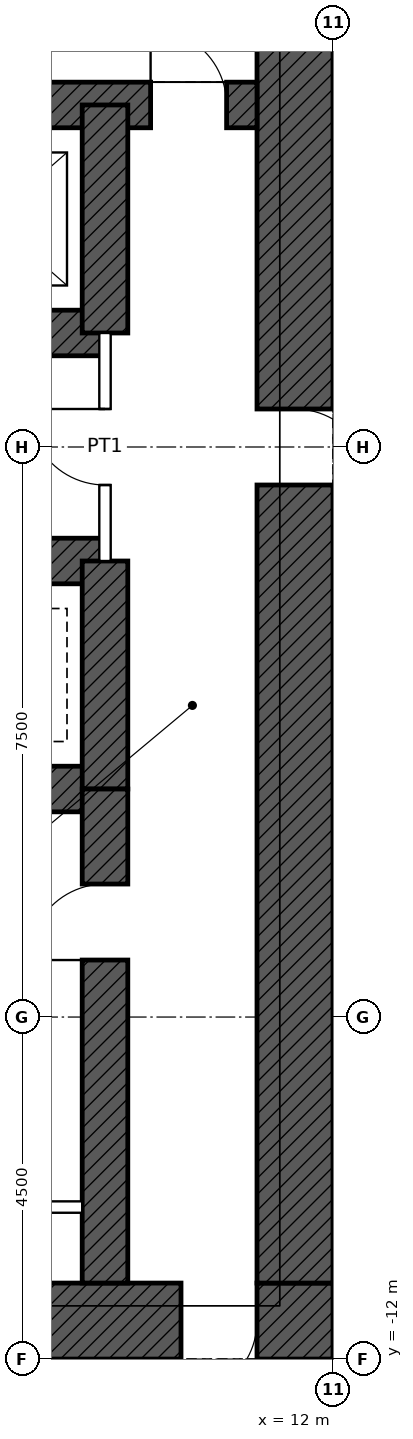
"""IFC4 building model, lengths in metres.
Left out: names, types, materials, properties, quantities, classifications, styles, units other than length and angle.
Written with IfcOpenShell. Run it as: python <this file> out.ifc"""

import sys

from ifc_helpers import new_model, si_unit, direction, frame, frame_2d, origin, place, context, subcontext, project, spatial, rectangle, extrude, element, fill, save


model = new_model("IFC4")
c1 = context("Model", 3, precision=1e-05, world=origin(), true_north=direction((0.0, 1.0)))
c2 = subcontext(c1, "Body", "Model", "MODEL_VIEW")
j1 = project(units=[si_unit("LENGTHUNIT", "METRE"), si_unit("PLANEANGLEUNIT", "RADIAN")], contexts=[c1])
p1 = place(None, origin())
s1 = spatial("IfcSite", under=j1, at=p1, CompositionType="ELEMENT")
p2 = place(p1, origin())
s2 = spatial("IfcBuilding", under=s1, at=p2, CompositionType="ELEMENT")
p3 = place(p2, frame((0.0, 0.0, 7.2)))
s3 = spatial("IfcBuildingStorey", under=s2, at=p3, CompositionType="ELEMENT", Elevation=7.2)
p4 = place(p3, frame((12.0, -11.5, 0.0), z_axis=(0.0, 0.0, 1.0), x_axis=(-1.0, 0.0, 0.0)))
e1 = element("IfcWall", 1, at=p4, inside=s3, PredefinedType="SHEAR", context=c2, shape_type="SweptSolid", body=[
    extrude(rectangle(XDim=24.0, YDim=1.0, at=frame_2d((12.0, 0.0))), origin(), (0.0, 0.0, 1.0), 5.4),
])
p5 = place(p4, frame((11.5, 0.0, 0.0)))
e2 = element("IfcOpeningElement", 2, at=p5, cuts=e1, PredefinedType="OPENING", context=c2, shape_type="SweptSolid", body=[
    extrude(rectangle(XDim=1.0, YDim=2.1, at=frame_2d((0.5, 1.05))), frame((0.0, 0.51, 0.0), z_axis=(0.0, -1.0, 0.0), x_axis=(1.0, 0.0, 0.0)), (0.0, 0.0, 1.0), 1.02),
])
p6 = place(p4, frame((1.0, 0.0, 0.0)))
e3 = element("IfcOpeningElement", 3, at=p6, cuts=e1, PredefinedType="OPENING", context=c2, shape_type="SweptSolid", body=[
    extrude(rectangle(XDim=1.0, YDim=2.4, at=frame_2d((0.5, 1.2))), frame((0.0, 0.51, 0.0), z_axis=(0.0, -1.0, 0.0), x_axis=(1.0, 0.0, 0.0)), (0.0, 0.0, 1.0), 1.02),
])
p7 = place(p3, frame((11.5, 11.0, 0.0), z_axis=(0.0, 0.0, 1.0), x_axis=(0.0, -1.0, 0.0)))
e4 = element("IfcWall", 4, at=p7, inside=s3, PredefinedType="SHEAR", context=c2, shape_type="SweptSolid", body=[
    extrude(rectangle(XDim=22.0, YDim=1.0, at=frame_2d((11.0, 0.0))), origin(), (0.0, 0.0, 1.0), 5.4),
])
p8 = place(p7, frame((10.5, 0.0, 0.0)))
e5 = element("IfcOpeningElement", 5, at=p8, cuts=e4, PredefinedType="OPENING", context=c2, shape_type="SweptSolid", body=[
    extrude(rectangle(XDim=1.0, YDim=2.4, at=frame_2d((0.5, 1.2))), frame((0.0, 0.51, 0.0), z_axis=(0.0, -1.0, 0.0), x_axis=(1.0, 0.0, 0.0)), (0.0, 0.0, 1.0), 1.02),
])
p9 = place(p3, frame((-11.0, 4.5, 0.0), z_axis=(0.0, 0.0, 1.0), x_axis=(1.0, 0.0, 0.0)))
e6 = element("IfcWall", 6, at=p9, inside=s3, PredefinedType="SHEAR", context=c2, shape_type="SweptSolid", body=[
    extrude(rectangle(XDim=22.0, YDim=0.6, at=frame_2d((11.0, 0.0))), origin(), (0.0, 0.0, 1.0), 5.4),
])
p10 = place(p9, frame((0.4, 0.0, 0.0)))
e7 = element("IfcOpeningElement", 7, at=p10, cuts=e6, PredefinedType="OPENING", context=c2, shape_type="SweptSolid", body=[
    extrude(rectangle(XDim=1.0, YDim=2.1, at=frame_2d((0.5, 1.05))), frame((0.0, 0.31, 0.0), z_axis=(0.0, -1.0, 0.0), x_axis=(1.0, 0.0, 0.0)), (0.0, 0.0, 1.0), 0.62),
])
p11 = place(p9, frame((20.6, 0.0, 0.0)))
e8 = element("IfcOpeningElement", 8, at=p11, cuts=e6, PredefinedType="OPENING", context=c2, shape_type="SweptSolid", body=[
    extrude(rectangle(XDim=1.0, YDim=2.1, at=frame_2d((0.5, 1.05))), frame((0.0, 0.31, 0.0), z_axis=(0.0, -1.0, 0.0), x_axis=(1.0, 0.0, 0.0)), (0.0, 0.0, 1.0), 0.62),
])
p12 = place(p3, frame((-9.0, 1.5, 0.0), z_axis=(0.0, 0.0, 1.0), x_axis=(1.0, 0.0, 0.0)))
e9 = element("IfcWall", 9, at=p12, inside=s3, PredefinedType="SHEAR", context=c2, shape_type="SweptSolid", body=[
    extrude(rectangle(XDim=18.0, YDim=0.6, at=frame_2d((9.0, 0.0))), origin(), (0.0, 0.0, 1.0), 5.4),
])
p13 = place(p12, frame((9.95, 0.0, 0.0)))
e10 = element("IfcOpeningElement", 10, at=p13, cuts=e9, PredefinedType="OPENING", context=c2, shape_type="SweptSolid", body=[
    extrude(rectangle(XDim=1.1, YDim=2.1, at=frame_2d((0.55, 1.05))), frame((0.0, 0.31, 0.0), z_axis=(0.0, -1.0, 0.0), x_axis=(1.0, 0.0, 0.0)), (0.0, 0.0, 1.0), 0.62),
])
p14 = place(p12, frame((12.95, 0.0, 0.0)))
e11 = element("IfcOpeningElement", 11, at=p14, cuts=e9, PredefinedType="OPENING", context=c2, shape_type="SweptSolid", body=[
    extrude(rectangle(XDim=1.1, YDim=2.1, at=frame_2d((0.55, 1.05))), frame((0.0, 0.31, 0.0), z_axis=(0.0, -1.0, 0.0), x_axis=(1.0, 0.0, 0.0)), (0.0, 0.0, 1.0), 0.62),
])
p15 = place(p12, frame((15.95, 0.0, 0.0)))
e12 = element("IfcOpeningElement", 12, at=p15, cuts=e9, PredefinedType="OPENING", context=c2, shape_type="SweptSolid", body=[
    extrude(rectangle(XDim=1.1, YDim=2.1, at=frame_2d((0.55, 1.05))), frame((0.0, 0.31, 0.0), z_axis=(0.0, -1.0, 0.0), x_axis=(1.0, 0.0, 0.0)), (0.0, 0.0, 1.0), 0.62),
])
p16 = place(p12, frame((0.95, 0.0, 0.0)))
e13 = element("IfcOpeningElement", 13, at=p16, cuts=e9, PredefinedType="OPENING", context=c2, shape_type="SweptSolid", body=[
    extrude(rectangle(XDim=1.1, YDim=2.1, at=frame_2d((0.55, 1.05))), frame((0.0, 0.31, 0.0), z_axis=(0.0, -1.0, 0.0), x_axis=(1.0, 0.0, 0.0)), (0.0, 0.0, 1.0), 0.62),
])
p17 = place(p12, frame((3.95, 0.0, 0.0)))
e14 = element("IfcOpeningElement", 14, at=p17, cuts=e9, PredefinedType="OPENING", context=c2, shape_type="SweptSolid", body=[
    extrude(rectangle(XDim=1.1, YDim=2.1, at=frame_2d((0.55, 1.05))), frame((0.0, 0.31, 0.0), z_axis=(0.0, -1.0, 0.0), x_axis=(1.0, 0.0, 0.0)), (0.0, 0.0, 1.0), 0.62),
])
p18 = place(p12, frame((6.95, 0.0, 0.0)))
e15 = element("IfcOpeningElement", 15, at=p18, cuts=e9, PredefinedType="OPENING", context=c2, shape_type="SweptSolid", body=[
    extrude(rectangle(XDim=1.1, YDim=2.1, at=frame_2d((0.55, 1.05))), frame((0.0, 0.31, 0.0), z_axis=(0.0, -1.0, 0.0), x_axis=(1.0, 0.0, 0.0)), (0.0, 0.0, 1.0), 0.62),
])
for number, where, z_axis, x_axis in (
    (16, (-9.0, -1.5, 0.0), (0.0, 0.0, 1.0), (1.0, 0.0, 0.0)),
    (17, (-9.0, -4.5, 0.0), (0.0, 0.0, 1.0), (1.0, 0.0, 0.0)),
):
    element("IfcWall", number, at=place(p3, frame(where, z_axis=z_axis, x_axis=x_axis)), inside=s3, PredefinedType="SHEAR", context=c2, shape_type="SweptSolid", body=[
        extrude(rectangle(XDim=18.0, YDim=0.6, at=frame_2d((9.0, 0.0))), origin(), (0.0, 0.0, 1.0), 5.4),
    ])
for number, where, z_axis, x_axis in (
    (18, (9.0, 1.5, 0.0), (0.0, 0.0, 1.0), (0.0, 1.0, 0.0)),
    (19, (9.0, -4.5, 0.0), (0.0, 0.0, 1.0), (0.0, 1.0, 0.0)),
):
    element("IfcWall", number, at=place(p3, frame(where, z_axis=z_axis, x_axis=x_axis)), inside=s3, PredefinedType="SHEAR", context=c2, shape_type="SweptSolid", body=[
        extrude(rectangle(XDim=3.0, YDim=0.6, at=frame_2d((1.5, 0.0))), origin(), (0.0, 0.0, 1.0), 5.4),
    ])
p19 = place(p3, frame((9.0, -11.0, 0.0), z_axis=(0.0, 0.0, 1.0), x_axis=(0.0, 1.0, 0.0)))
e20 = element("IfcWall", 20, at=p19, inside=s3, PredefinedType="SHEAR", context=c2, shape_type="SweptSolid", body=[
    extrude(rectangle(XDim=6.5, YDim=0.6, at=frame_2d((3.25, 0.0))), origin(), (0.0, 0.0, 1.0), 5.4),
])
p20 = place(p19, frame((4.25, 0.0, 0.0)))
e21 = element("IfcOpeningElement", 21, at=p20, cuts=e20, PredefinedType="OPENING", context=c2, shape_type="SweptSolid", body=[
    extrude(rectangle(XDim=1.0, YDim=2.1, at=frame_2d((0.5, 1.05))), frame((0.0, 0.31, 0.0), z_axis=(0.0, -1.0, 0.0), x_axis=(1.0, 0.0, 0.0)), (0.0, 0.0, 1.0), 0.62),
])
p21 = place(p3, frame((3.3, -10.0, 0.0), z_axis=(0.0, 0.0, 1.0), x_axis=(1.0, 0.0, 0.0)))
e22 = element("IfcWall", 22, at=p21, inside=s3, PredefinedType="PARTITIONING", context=c2, shape_type="SweptSolid", body=[
    extrude(rectangle(XDim=5.4, YDim=0.15, at=frame_2d((2.7, 0.0))), origin(), (0.0, 0.0, 1.0), 5.15),
])
p22 = place(p21, frame((2.2, 0.0, 0.0)))
e23 = element("IfcOpeningElement", 23, at=p22, cuts=e22, PredefinedType="OPENING", context=c2, shape_type="SweptSolid", body=[
    extrude(rectangle(XDim=1.0, YDim=2.1, at=frame_2d((0.5, 1.05))), frame((0.0, 0.085, 0.0), z_axis=(0.0, -1.0, 0.0), x_axis=(1.0, 0.0, 0.0)), (0.0, 0.0, 1.0), 0.17),
])
p23 = place(p3, frame((9.0, -1.5, 0.0), z_axis=(0.0, 0.0, 1.0), x_axis=(0.0, 1.0, 0.0)))
e24 = element("IfcWall", 24, at=p23, inside=s3, PredefinedType="PARTITIONING", context=c2, shape_type="SweptSolid", body=[
    extrude(rectangle(XDim=3.0, YDim=0.15, at=frame_2d((1.5, 0.0))), origin(), (0.0, 0.0, 1.0), 5.15),
])
p24 = place(p23, frame((1.0, 0.0, 0.0)))
e25 = element("IfcOpeningElement", 25, at=p24, cuts=e24, PredefinedType="OPENING", context=c2, shape_type="SweptSolid", body=[
    extrude(rectangle(XDim=1.0, YDim=2.4, at=frame_2d((0.5, 1.2))), frame((0.0, 0.085, 0.0), z_axis=(0.0, -1.0, 0.0), x_axis=(1.0, 0.0, 0.0)), (0.0, 0.0, 1.0), 0.17),
])
p25 = place(p11, origin())
e26 = element("IfcDoor", 26, at=p25, inside=s3, OperationType="SINGLE_SWING_LEFT", PredefinedType="DOOR", context=c2, shape_type="SweptSolid", body=[
    extrude(rectangle(XDim=1.0, YDim=2.1, at=frame_2d((0.5, 1.05))), frame((0.0, 0.025, 0.0), z_axis=(0.0, -1.0, 0.0), x_axis=(1.0, 0.0, 0.0)), (0.0, 0.0, 1.0), 0.05),
])
fill(e8, e26)
p26 = place(p8, origin())
e27 = element("IfcDoor", 27, at=p26, inside=s3, OperationType="SINGLE_SWING_RIGHT", PredefinedType="DOOR", context=c2, shape_type="SweptSolid", body=[
    extrude(rectangle(XDim=1.0, YDim=2.4, at=frame_2d((0.5, 1.2))), frame((0.0, 0.485, 0.0), z_axis=(0.0, -1.0, 0.0), x_axis=(1.0, 0.0, 0.0)), (0.0, 0.0, 1.0), 0.05),
])
fill(e5, e27)
p27 = place(p6, origin())
e28 = element("IfcDoor", 28, at=p27, inside=s3, OperationType="SINGLE_SWING_RIGHT", PredefinedType="DOOR", context=c2, shape_type="SweptSolid", body=[
    extrude(rectangle(XDim=1.0, YDim=2.4, at=frame_2d((0.5, 1.2))), frame((0.0, 0.485, 0.0), z_axis=(0.0, -1.0, 0.0), x_axis=(1.0, 0.0, 0.0)), (0.0, 0.0, 1.0), 0.05),
])
fill(e3, e28)
p28 = place(p20, origin())
e29 = element("IfcDoor", 29, at=p28, inside=s3, OperationType="SINGLE_SWING_LEFT", PredefinedType="DOOR", context=c2, shape_type="SweptSolid", body=[
    extrude(rectangle(XDim=1.0, YDim=2.1, at=frame_2d((0.5, 1.05))), frame((0.0, 0.025, 0.0), z_axis=(0.0, -1.0, 0.0), x_axis=(1.0, 0.0, 0.0)), (0.0, 0.0, 1.0), 0.05),
])
fill(e21, e29)
p29 = place(p24, origin())
e30 = element("IfcDoor", 30, at=p29, inside=s3, OperationType="SINGLE_SWING_RIGHT", PredefinedType="DOOR", context=c2, shape_type="SweptSolid", body=[
    extrude(rectangle(XDim=1.0, YDim=2.4, at=frame_2d((0.5, 1.2))), frame((0.0, 0.025, 0.0), z_axis=(0.0, -1.0, 0.0), x_axis=(1.0, 0.0, 0.0)), (0.0, 0.0, 1.0), 0.05),
])
fill(e25, e30)
save(model, sys.argv[1])
